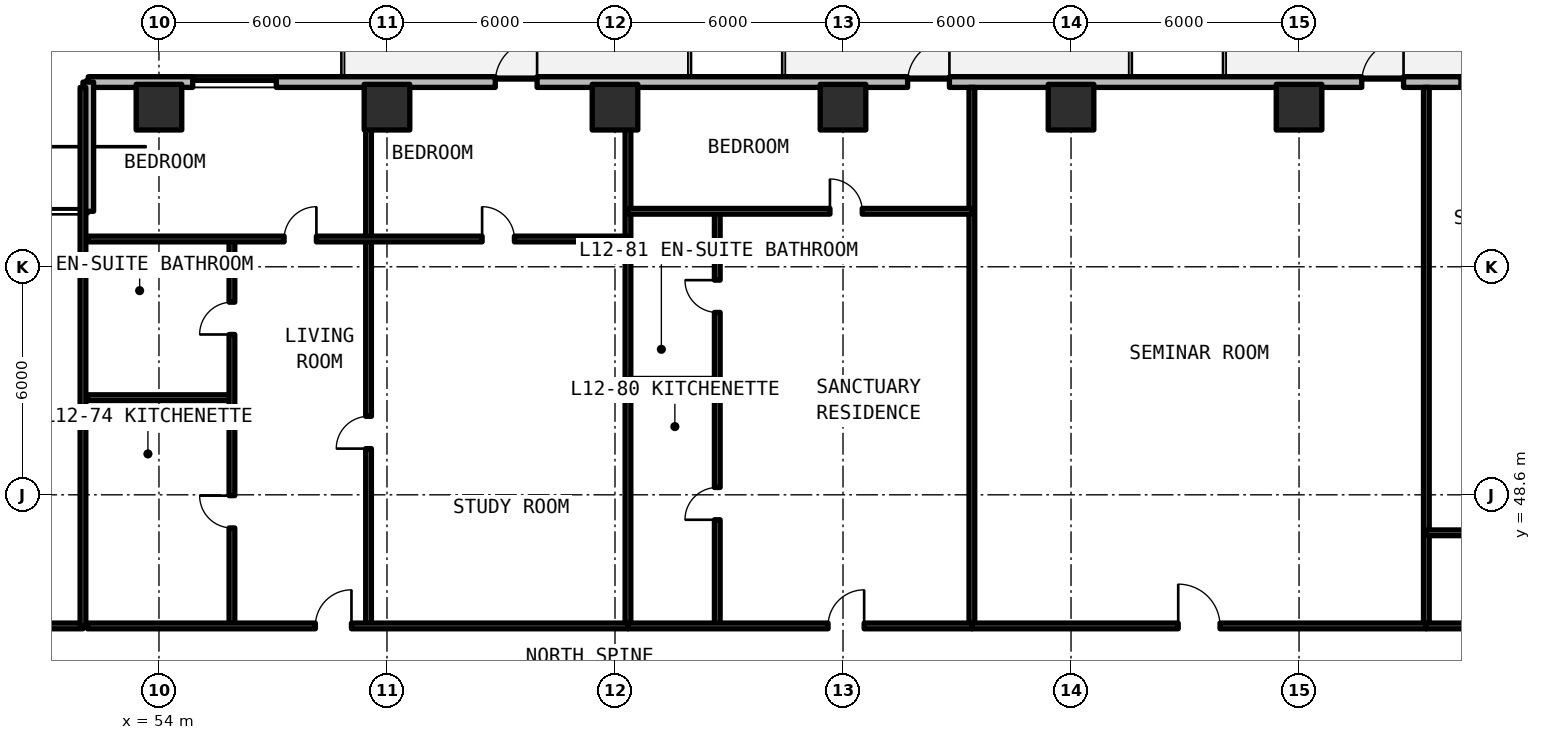
"""IFC4 building model, lengths in metres.
Left out: names, types, materials, properties, quantities, classifications, styles, units other than length and angle.
Written with IfcOpenShell. Run it as: python <this file> out.ifc"""

import sys

from ifc_helpers import new_model, si_unit, direction, frame, frame_2d, origin, origin_2d, place, context, subcontext, project, spatial, rectangle, extrude, element, fill, save


model = new_model("IFC4")
c1 = context("Model", 3, precision=1e-05, world=origin(), true_north=direction((0.0, 1.0)))
c2 = subcontext(c1, "Body", "Model", "MODEL_VIEW")
j1 = project(units=[si_unit("LENGTHUNIT", "METRE"), si_unit("PLANEANGLEUNIT", "RADIAN")], contexts=[c1])
p1 = place(None, origin())
s1 = spatial("IfcSite", under=j1, at=p1, CompositionType="ELEMENT")
p2 = place(p1, origin())
s2 = spatial("IfcBuilding", under=s1, at=p2, CompositionType="ELEMENT")
p3 = place(p2, frame((0.0, 0.0, 45.54)))
s3 = spatial("IfcBuildingStorey", under=s2, at=p3, CompositionType="ELEMENT", Elevation=45.54)
for number, where, z_axis, x_axis in (
    (1, (54.0, 58.8, 0.0), (0.0, 0.0, 1.0), (1.0, 0.0, 0.0)),
    (2, (60.0, 58.8, 0.0), (0.0, 0.0, 1.0), (1.0, 0.0, 0.0)),
    (3, (66.0, 58.8, 0.0), (0.0, 0.0, 1.0), (1.0, 0.0, 0.0)),
    (4, (72.0, 58.8, 0.0), (0.0, 0.0, 1.0), (1.0, 0.0, 0.0)),
    (5, (78.0, 58.8, 0.0), (0.0, 0.0, 1.0), (1.0, 0.0, 0.0)),
    (6, (84.0, 58.8, 0.0), (0.0, 0.0, 1.0), (1.0, 0.0, 0.0)),
):
    element("IfcColumn", number, at=place(p3, frame(where, z_axis=z_axis, x_axis=x_axis)), inside=s3, PredefinedType="COLUMN", context=c2, shape_type="SweptSolid", body=[
        extrude(rectangle(XDim=1.2, YDim=1.2, at=origin_2d()), origin(), (0.0, 0.0, 1.0), 3.3),
    ])
p4 = place(p3, frame((96.542, 59.46, 0.0), z_axis=(0.0, 0.0, 1.0), x_axis=(-1.0, 0.0, 0.0)))
e7 = element("IfcWall", 7, at=p4, inside=s3, PredefinedType="SOLIDWALL", context=c2, shape_type="SweptSolid", body=[
    extrude(rectangle(XDim=44.402, YDim=0.28, at=frame_2d((22.201, 0.0))), origin(), (0.0, 0.0, 1.0), 3.08),
])
p5 = place(p4, frame((32.592, 0.0, 0.0)))
e8 = element("IfcOpeningElement", 8, at=p5, cuts=e7, PredefinedType="OPENING", context=c2, shape_type="SweptSolid", body=[
    extrude(rectangle(XDim=1.1, YDim=2.15, at=frame_2d((0.55, 1.075))), frame((0.0, 0.15, 0.0), z_axis=(0.0, -1.0, 0.0), x_axis=(1.0, 0.0, 0.0)), (0.0, 0.0, 1.0), 0.3),
])
p6 = place(p4, frame((21.742, 0.0, 0.0)))
e9 = element("IfcOpeningElement", 9, at=p6, cuts=e7, PredefinedType="OPENING", context=c2, shape_type="SweptSolid", body=[
    extrude(rectangle(XDim=1.1, YDim=2.15, at=frame_2d((0.55, 1.075))), frame((0.0, 0.15, 0.0), z_axis=(0.0, -1.0, 0.0), x_axis=(1.0, 0.0, 0.0)), (0.0, 0.0, 1.0), 0.3),
])
p7 = place(p4, frame((9.792, 0.0, 0.0)))
e10 = element("IfcOpeningElement", 10, at=p7, cuts=e7, PredefinedType="OPENING", context=c2, shape_type="SweptSolid", body=[
    extrude(rectangle(XDim=1.1, YDim=2.15, at=frame_2d((0.55, 1.075))), frame((0.0, 0.15, 0.0), z_axis=(0.0, -1.0, 0.0), x_axis=(1.0, 0.0, 0.0)), (0.0, 0.0, 1.0), 0.3),
])
p8 = place(p4, frame((39.455, 0.0, 0.78)))
e11 = element("IfcOpeningElement", 11, at=p8, cuts=e7, PredefinedType="OPENING", context=c2, shape_type="SweptSolid", body=[
    extrude(rectangle(XDim=2.2, YDim=1.66, at=frame_2d((1.1, 0.83))), frame((0.0, 0.15, 0.0), z_axis=(0.0, -1.0, 0.0), x_axis=(1.0, 0.0, 0.0)), (0.0, 0.0, 1.0), 0.3),
])
p9 = place(p4, frame((7.432, 0.0, 0.78)))
e12 = element("IfcOpeningElement", 12, at=p9, cuts=e7, PredefinedType="OPENING", context=c2, shape_type="SweptSolid", body=[
    extrude(rectangle(XDim=0.85, YDim=1.65, at=frame_2d((0.425, 0.825))), frame((0.0, 0.15, 0.0), z_axis=(0.0, -1.0, 0.0), x_axis=(1.0, 0.0, 0.0)), (0.0, 0.0, 1.0), 0.3),
])
p10 = place(p4, frame((1.292, 0.0, 0.78)))
e13 = element("IfcOpeningElement", 13, at=p10, cuts=e7, PredefinedType="OPENING", context=c2, shape_type="SweptSolid", body=[
    extrude(rectangle(XDim=2.2, YDim=1.66, at=frame_2d((1.1, 0.83))), frame((0.0, 0.15, 0.0), z_axis=(0.0, -1.0, 0.0), x_axis=(1.0, 0.0, 0.0)), (0.0, 0.0, 1.0), 0.3),
])
p11 = place(p3, frame((52.14, 59.46, 0.0), z_axis=(0.0, 0.0, 1.0), x_axis=(0.0, -1.0, 0.0)))
e14 = element("IfcWall", 14, at=p11, inside=s3, PredefinedType="SOLIDWALL", context=c2, shape_type="SweptSolid", body=[
    extrude(rectangle(XDim=3.4, YDim=0.28, at=frame_2d((1.7, 0.0))), origin(), (0.0, 0.0, 1.0), 3.08),
])
p12 = place(p3, frame((43.6, 45.15, 0.0), z_axis=(0.0, 0.0, 1.0), x_axis=(1.0, 0.0, 0.0)))
e15 = element("IfcWall", 15, at=p12, inside=s3, PredefinedType="SOLIDWALL", context=c2, shape_type="SweptSolid", body=[
    extrude(rectangle(XDim=8.4, YDim=0.15, at=frame_2d((4.2, 0.0))), origin(), (0.0, 0.0, 1.0), 2.35),
])
p13 = place(p12, frame((3.65, 0.0, 0.0)))
e16 = element("IfcOpeningElement", 16, at=p13, cuts=e15, PredefinedType="OPENING", context=c2, shape_type="SweptSolid", body=[
    extrude(rectangle(XDim=1.1, YDim=2.15, at=frame_2d((0.55, 1.075))), frame((0.0, 0.085, 0.0), z_axis=(0.0, -1.0, 0.0), x_axis=(1.0, 0.0, 0.0)), (0.0, 0.0, 1.0), 0.17),
])
for number, where, z_axis, x_axis in (
    (17, (52.0, 45.15, 0.0), (0.0, 0.0, 1.0), (0.0, 1.0, 0.0)),
    (18, (66.341, 45.15, 0.0), (0.0, 0.0, 1.0), (0.0, 1.0, 0.0)),
):
    element("IfcWall", number, at=place(p3, frame(where, z_axis=z_axis, x_axis=x_axis)), inside=s3, PredefinedType="SOLIDWALL", context=c2, shape_type="SweptSolid", body=[
        extrude(rectangle(XDim=14.17, YDim=0.15, at=frame_2d((7.085, 0.0))), origin(), (0.0, 0.0, 1.0), 2.35),
    ])
p14 = place(p3, frame((59.515, 45.15, 0.0), z_axis=(0.0, 0.0, 1.0), x_axis=(0.0, 1.0, 0.0)))
e19 = element("IfcWall", 19, at=p14, inside=s3, PredefinedType="PARTITIONING", context=c2, shape_type="SweptSolid", body=[
    extrude(rectangle(XDim=10.181, YDim=0.15, at=frame_2d((5.09, 0.0))), origin(), (0.0, 0.0, 1.0), 2.35),
])
p15 = place(p14, frame((4.666, 0.0, 0.0)))
e20 = element("IfcOpeningElement", 20, at=p15, cuts=e19, PredefinedType="OPENING", context=c2, shape_type="SweptSolid", body=[
    extrude(rectangle(XDim=0.85, YDim=2.1, at=frame_2d((0.425, 1.05))), frame((0.0, 0.085, 0.0), z_axis=(0.0, -1.0, 0.0), x_axis=(1.0, 0.0, 0.0)), (0.0, 0.0, 1.0), 0.17),
])
p16 = place(p3, frame((52.12, 51.157, 0.0), z_axis=(0.0, 0.0, 1.0), x_axis=(1.0, 0.0, 0.0)))
e21 = element("IfcWall", 21, at=p16, inside=s3, PredefinedType="PARTITIONING", context=c2, shape_type="SweptSolid", body=[
    extrude(rectangle(XDim=3.8, YDim=0.15, at=frame_2d((1.9, 0.0))), origin(), (0.0, 0.0, 1.0), 2.35),
])
p17 = place(p3, frame((55.92, 45.15, 0.0), z_axis=(0.0, 0.0, 1.0), x_axis=(0.0, 1.0, 0.0)))
e22 = element("IfcWall", 22, at=p17, inside=s3, PredefinedType="PARTITIONING", context=c2, shape_type="SweptSolid", body=[
    extrude(rectangle(XDim=10.181, YDim=0.15, at=frame_2d((5.09, 0.0))), origin(), (0.0, 0.0, 1.0), 2.35),
])
p18 = place(p17, frame((2.578, 0.0, 0.0)))
e23 = element("IfcOpeningElement", 23, at=p18, cuts=e22, PredefinedType="OPENING", context=c2, shape_type="SweptSolid", body=[
    extrude(rectangle(XDim=0.85, YDim=2.1, at=frame_2d((0.425, 1.05))), frame((0.0, 0.085, 0.0), z_axis=(0.0, -1.0, 0.0), x_axis=(1.0, 0.0, 0.0)), (0.0, 0.0, 1.0), 0.17),
])
p19 = place(p17, frame((7.669, 0.0, 0.0)))
e24 = element("IfcOpeningElement", 24, at=p19, cuts=e22, PredefinedType="OPENING", context=c2, shape_type="SweptSolid", body=[
    extrude(rectangle(XDim=0.85, YDim=2.1, at=frame_2d((0.425, 1.05))), frame((0.0, 0.085, 0.0), z_axis=(0.0, -1.0, 0.0), x_axis=(1.0, 0.0, 0.0)), (0.0, 0.0, 1.0), 0.17),
])
p20 = place(p3, frame((59.515, 55.331, 0.0), z_axis=(0.0, 0.0, 1.0), x_axis=(0.0, 1.0, 0.0)))
e25 = element("IfcWall", 25, at=p20, inside=s3, PredefinedType="PARTITIONING", context=c2, shape_type="SweptSolid", body=[
    extrude(rectangle(XDim=3.989, YDim=0.15, at=frame_2d((1.995, 0.0))), origin(), (0.0, 0.0, 1.0), 2.35),
])
p21 = place(p3, frame((52.12, 55.331, 0.0), z_axis=(0.0, 0.0, 1.0), x_axis=(1.0, 0.0, 0.0)))
e26 = element("IfcWall", 26, at=p21, inside=s3, PredefinedType="PARTITIONING", context=c2, shape_type="SweptSolid", body=[
    extrude(rectangle(XDim=14.221, YDim=0.15, at=frame_2d((7.111, 0.0))), origin(), (0.0, 0.0, 1.0), 2.35),
])
p22 = place(p21, frame((5.173, 0.0, 0.0)))
e27 = element("IfcOpeningElement", 27, at=p22, cuts=e26, PredefinedType="OPENING", context=c2, shape_type="SweptSolid", body=[
    extrude(rectangle(XDim=0.85, YDim=2.1, at=frame_2d((0.425, 1.05))), frame((0.0, 0.085, 0.0), z_axis=(0.0, -1.0, 0.0), x_axis=(1.0, 0.0, 0.0)), (0.0, 0.0, 1.0), 0.17),
])
p23 = place(p21, frame((10.383, 0.0, 0.0)))
e28 = element("IfcOpeningElement", 28, at=p23, cuts=e26, PredefinedType="OPENING", context=c2, shape_type="SweptSolid", body=[
    extrude(rectangle(XDim=0.85, YDim=2.1, at=frame_2d((0.425, 1.05))), frame((0.0, 0.085, 0.0), z_axis=(0.0, -1.0, 0.0), x_axis=(1.0, 0.0, 0.0)), (0.0, 0.0, 1.0), 0.17),
])
p24 = place(p3, frame((52.12, 45.15, 0.0), z_axis=(0.0, 0.0, 1.0), x_axis=(1.0, 0.0, 0.0)))
e29 = element("IfcWall", 29, at=p24, inside=s3, PredefinedType="SOLIDWALL", context=c2, shape_type="SweptSolid", body=[
    extrude(rectangle(XDim=14.221, YDim=0.15, at=frame_2d((7.111, 0.0))), origin(), (0.0, 0.0, 1.0), 2.35),
])
p25 = place(p24, frame((5.995, 0.0, 0.0)))
e30 = element("IfcOpeningElement", 30, at=p25, cuts=e29, PredefinedType="OPENING", context=c2, shape_type="SweptSolid", body=[
    extrude(rectangle(XDim=0.95, YDim=2.15, at=frame_2d((0.475, 1.075))), frame((0.0, 0.085, 0.0), z_axis=(0.0, -1.0, 0.0), x_axis=(1.0, 0.0, 0.0)), (0.0, 0.0, 1.0), 0.17),
])
p26 = place(p3, frame((75.391, 45.15, 0.0), z_axis=(0.0, 0.0, 1.0), x_axis=(0.0, 1.0, 0.0)))
e31 = element("IfcWall", 31, at=p26, inside=s3, PredefinedType="SOLIDWALL", context=c2, shape_type="SweptSolid", body=[
    extrude(rectangle(XDim=14.17, YDim=0.15, at=frame_2d((7.085, 0.0))), origin(), (0.0, 0.0, 1.0), 2.35),
])
p27 = place(p3, frame((66.341, 51.587, 0.0), z_axis=(0.0, 0.0, 1.0), x_axis=(1.0, 0.0, 0.0)))
e32 = element("IfcWall", 32, at=p27, inside=s3, PredefinedType="PARTITIONING", context=c2, shape_type="SweptSolid", body=[
    extrude(rectangle(XDim=2.35, YDim=0.15, at=frame_2d((1.175, 0.0))), origin(), (0.0, 0.0, 1.0), 2.35),
])
p28 = place(p3, frame((68.691, 45.15, 0.0), z_axis=(0.0, 0.0, 1.0), x_axis=(0.0, 1.0, 0.0)))
e33 = element("IfcWall", 33, at=p28, inside=s3, PredefinedType="PARTITIONING", context=c2, shape_type="SweptSolid", body=[
    extrude(rectangle(XDim=10.91, YDim=0.15, at=frame_2d((5.455, 0.0))), origin(), (0.0, 0.0, 1.0), 2.35),
])
p29 = place(p28, frame((2.794, 0.0, 0.0)))
e34 = element("IfcOpeningElement", 34, at=p29, cuts=e33, PredefinedType="OPENING", context=c2, shape_type="SweptSolid", body=[
    extrude(rectangle(XDim=0.85, YDim=2.1, at=frame_2d((0.425, 1.05))), frame((0.0, 0.085, 0.0), z_axis=(0.0, -1.0, 0.0), x_axis=(1.0, 0.0, 0.0)), (0.0, 0.0, 1.0), 0.17),
])
p30 = place(p28, frame((8.249, 0.0, 0.0)))
e35 = element("IfcOpeningElement", 35, at=p30, cuts=e33, PredefinedType="OPENING", context=c2, shape_type="SweptSolid", body=[
    extrude(rectangle(XDim=0.85, YDim=2.1, at=frame_2d((0.425, 1.05))), frame((0.0, 0.085, 0.0), z_axis=(0.0, -1.0, 0.0), x_axis=(1.0, 0.0, 0.0)), (0.0, 0.0, 1.0), 0.17),
])
p31 = place(p3, frame((66.341, 56.06, 0.0), z_axis=(0.0, 0.0, 1.0), x_axis=(1.0, 0.0, 0.0)))
e36 = element("IfcWall", 36, at=p31, inside=s3, PredefinedType="PARTITIONING", context=c2, shape_type="SweptSolid", body=[
    extrude(rectangle(XDim=9.05, YDim=0.15, at=frame_2d((4.525, 0.0))), origin(), (0.0, 0.0, 1.0), 2.35),
])
p32 = place(p31, frame((5.315, 0.0, 0.0)))
e37 = element("IfcOpeningElement", 37, at=p32, cuts=e36, PredefinedType="OPENING", context=c2, shape_type="SweptSolid", body=[
    extrude(rectangle(XDim=0.85, YDim=2.1, at=frame_2d((0.425, 1.05))), frame((0.0, 0.085, 0.0), z_axis=(0.0, -1.0, 0.0), x_axis=(1.0, 0.0, 0.0)), (0.0, 0.0, 1.0), 0.17),
])
p33 = place(p3, frame((66.341, 45.15, 0.0), z_axis=(0.0, 0.0, 1.0), x_axis=(1.0, 0.0, 0.0)))
e38 = element("IfcWall", 38, at=p33, inside=s3, PredefinedType="SOLIDWALL", context=c2, shape_type="SweptSolid", body=[
    extrude(rectangle(XDim=9.05, YDim=0.15, at=frame_2d((4.525, 0.0))), origin(), (0.0, 0.0, 1.0), 2.35),
])
p34 = place(p33, frame((5.265, 0.0, 0.0)))
e39 = element("IfcOpeningElement", 39, at=p34, cuts=e38, PredefinedType="OPENING", context=c2, shape_type="SweptSolid", body=[
    extrude(rectangle(XDim=0.95, YDim=2.15, at=frame_2d((0.475, 1.075))), frame((0.0, 0.085, 0.0), z_axis=(0.0, -1.0, 0.0), x_axis=(1.0, 0.0, 0.0)), (0.0, 0.0, 1.0), 0.17),
])
p35 = place(p3, frame((87.35, 45.15, 0.0), z_axis=(0.0, 0.0, 1.0), x_axis=(0.0, 1.0, 0.0)))
e40 = element("IfcWall", 40, at=p35, inside=s3, PredefinedType="SOLIDWALL", context=c2, shape_type="SweptSolid", body=[
    extrude(rectangle(XDim=14.17, YDim=0.15, at=frame_2d((7.085, 0.0))), origin(), (0.0, 0.0, 1.0), 2.35),
])
p36 = place(p3, frame((75.391, 45.15, 0.0), z_axis=(0.0, 0.0, 1.0), x_axis=(1.0, 0.0, 0.0)))
e41 = element("IfcWall", 41, at=p36, inside=s3, PredefinedType="SOLIDWALL", context=c2, shape_type="SweptSolid", body=[
    extrude(rectangle(XDim=11.959, YDim=0.15, at=frame_2d((5.979, 0.0))), origin(), (0.0, 0.0, 1.0), 2.35),
])
p37 = place(p36, frame((5.429, 0.0, 0.0)))
e42 = element("IfcOpeningElement", 42, at=p37, cuts=e41, PredefinedType="OPENING", context=c2, shape_type="SweptSolid", body=[
    extrude(rectangle(XDim=1.1, YDim=2.15, at=frame_2d((0.55, 1.075))), frame((0.0, 0.085, 0.0), z_axis=(0.0, -1.0, 0.0), x_axis=(1.0, 0.0, 0.0)), (0.0, 0.0, 1.0), 0.17),
])
p38 = place(p3, frame((87.35, 47.6, 0.0), z_axis=(0.0, 0.0, 1.0), x_axis=(1.0, 0.0, 0.0)))
e43 = element("IfcWall", 43, at=p38, inside=s3, PredefinedType="PARTITIONING", context=c2, shape_type="SweptSolid", body=[
    extrude(rectangle(XDim=4.57, YDim=0.15, at=frame_2d((2.285, 0.0))), origin(), (0.0, 0.0, 1.0), 2.35),
])
p39 = place(p3, frame((87.35, 45.15, 0.0), z_axis=(0.0, 0.0, 1.0), x_axis=(1.0, 0.0, 0.0)))
e44 = element("IfcWall", 44, at=p39, inside=s3, PredefinedType="SOLIDWALL", context=c2, shape_type="SweptSolid", body=[
    extrude(rectangle(XDim=9.05, YDim=0.15, at=frame_2d((4.525, 0.0))), origin(), (0.0, 0.0, 1.0), 2.35),
])
p40 = place(p39, frame((6.375, 0.0, 0.0)))
e45 = element("IfcOpeningElement", 45, at=p40, cuts=e44, PredefinedType="OPENING", context=c2, shape_type="SweptSolid", body=[
    extrude(rectangle(XDim=0.95, YDim=2.15, at=frame_2d((0.475, 1.075))), frame((0.0, 0.085, 0.0), z_axis=(0.0, -1.0, 0.0), x_axis=(1.0, 0.0, 0.0)), (0.0, 0.0, 1.0), 0.17),
])
p41 = place(p5, frame((1.1, 0.0, 0.0), z_axis=(0.0, 0.0, 1.0), x_axis=(-1.0, 0.0, 0.0)))
e46 = element("IfcDoor", 46, at=p41, inside=s3, OperationType="SINGLE_SWING_RIGHT", PredefinedType="DOOR", context=c2, shape_type="SweptSolid", body=[
    extrude(rectangle(XDim=1.1, YDim=2.15, at=frame_2d((0.55, 1.075))), frame((0.0, 0.025, 0.0), z_axis=(0.0, -1.0, 0.0), x_axis=(1.0, 0.0, 0.0)), (0.0, 0.0, 1.0), 0.05),
])
fill(e8, e46)
p42 = place(p6, frame((1.1, 0.0, 0.0), z_axis=(0.0, 0.0, 1.0), x_axis=(-1.0, 0.0, 0.0)))
e47 = element("IfcDoor", 47, at=p42, inside=s3, OperationType="SINGLE_SWING_LEFT", PredefinedType="DOOR", context=c2, shape_type="SweptSolid", body=[
    extrude(rectangle(XDim=1.1, YDim=2.15, at=frame_2d((0.55, 1.075))), frame((0.0, 0.025, 0.0), z_axis=(0.0, -1.0, 0.0), x_axis=(1.0, 0.0, 0.0)), (0.0, 0.0, 1.0), 0.05),
])
fill(e9, e47)
p43 = place(p7, frame((1.1, 0.0, 0.0), z_axis=(0.0, 0.0, 1.0), x_axis=(-1.0, 0.0, 0.0)))
e48 = element("IfcDoor", 48, at=p43, inside=s3, OperationType="SINGLE_SWING_RIGHT", PredefinedType="DOOR", context=c2, shape_type="SweptSolid", body=[
    extrude(rectangle(XDim=1.1, YDim=2.15, at=frame_2d((0.55, 1.075))), frame((0.0, 0.025, 0.0), z_axis=(0.0, -1.0, 0.0), x_axis=(1.0, 0.0, 0.0)), (0.0, 0.0, 1.0), 0.05),
])
fill(e10, e48)
p44 = place(p8, origin())
e49 = element("IfcWindow", 49, at=p44, inside=s3, PartitioningType="SINGLE_PANEL", PredefinedType="WINDOW", context=c2, shape_type="SweptSolid", body=[
    extrude(rectangle(XDim=2.2, YDim=1.66, at=frame_2d((1.1, 0.83))), frame((0.0, 0.03, 0.0), z_axis=(0.0, -1.0, 0.0), x_axis=(1.0, 0.0, 0.0)), (0.0, 0.0, 1.0), 0.06),
])
fill(e11, e49)
p45 = place(p9, origin())
e50 = element("IfcWindow", 50, at=p45, inside=s3, PartitioningType="SINGLE_PANEL", PredefinedType="WINDOW", context=c2, shape_type="SweptSolid", body=[
    extrude(rectangle(XDim=0.85, YDim=1.65, at=frame_2d((0.425, 0.825))), frame((0.0, 0.03, 0.0), z_axis=(0.0, -1.0, 0.0), x_axis=(1.0, 0.0, 0.0)), (0.0, 0.0, 1.0), 0.06),
])
fill(e12, e50)
p46 = place(p15, origin())
e51 = element("IfcDoor", 51, at=p46, inside=s3, OperationType="SINGLE_SWING_LEFT", PredefinedType="DOOR", context=c2, shape_type="SweptSolid", body=[
    extrude(rectangle(XDim=0.85, YDim=2.1, at=frame_2d((0.425, 1.05))), frame((0.0, 0.025, 0.0), z_axis=(0.0, -1.0, 0.0), x_axis=(1.0, 0.0, 0.0)), (0.0, 0.0, 1.0), 0.05),
])
fill(e20, e51)
p47 = place(p18, origin())
e52 = element("IfcDoor", 52, at=p47, inside=s3, OperationType="SINGLE_SWING_RIGHT", PredefinedType="DOOR", context=c2, shape_type="SweptSolid", body=[
    extrude(rectangle(XDim=0.85, YDim=2.1, at=frame_2d((0.425, 1.05))), frame((0.0, 0.025, 0.0), z_axis=(0.0, -1.0, 0.0), x_axis=(1.0, 0.0, 0.0)), (0.0, 0.0, 1.0), 0.05),
])
fill(e23, e52)
p48 = place(p19, origin())
e53 = element("IfcDoor", 53, at=p48, inside=s3, OperationType="SINGLE_SWING_LEFT", PredefinedType="DOOR", context=c2, shape_type="SweptSolid", body=[
    extrude(rectangle(XDim=0.85, YDim=2.1, at=frame_2d((0.425, 1.05))), frame((0.0, 0.025, 0.0), z_axis=(0.0, -1.0, 0.0), x_axis=(1.0, 0.0, 0.0)), (0.0, 0.0, 1.0), 0.05),
])
fill(e24, e53)
p49 = place(p22, origin())
e54 = element("IfcDoor", 54, at=p49, inside=s3, OperationType="SINGLE_SWING_RIGHT", PredefinedType="DOOR", context=c2, shape_type="SweptSolid", body=[
    extrude(rectangle(XDim=0.85, YDim=2.1, at=frame_2d((0.425, 1.05))), frame((0.0, 0.025, 0.0), z_axis=(0.0, -1.0, 0.0), x_axis=(1.0, 0.0, 0.0)), (0.0, 0.0, 1.0), 0.05),
])
fill(e27, e54)
p50 = place(p23, origin())
e55 = element("IfcDoor", 55, at=p50, inside=s3, OperationType="SINGLE_SWING_LEFT", PredefinedType="DOOR", context=c2, shape_type="SweptSolid", body=[
    extrude(rectangle(XDim=0.85, YDim=2.1, at=frame_2d((0.425, 1.05))), frame((0.0, 0.025, 0.0), z_axis=(0.0, -1.0, 0.0), x_axis=(1.0, 0.0, 0.0)), (0.0, 0.0, 1.0), 0.05),
])
fill(e28, e55)
p51 = place(p25, origin())
e56 = element("IfcDoor", 56, at=p51, inside=s3, OperationType="SINGLE_SWING_RIGHT", PredefinedType="DOOR", context=c2, shape_type="SweptSolid", body=[
    extrude(rectangle(XDim=0.95, YDim=2.15, at=frame_2d((0.475, 1.075))), frame((0.0, 0.025, 0.0), z_axis=(0.0, -1.0, 0.0), x_axis=(1.0, 0.0, 0.0)), (0.0, 0.0, 1.0), 0.05),
])
fill(e30, e56)
p52 = place(p29, origin())
e57 = element("IfcDoor", 57, at=p52, inside=s3, OperationType="SINGLE_SWING_LEFT", PredefinedType="DOOR", context=c2, shape_type="SweptSolid", body=[
    extrude(rectangle(XDim=0.85, YDim=2.1, at=frame_2d((0.425, 1.05))), frame((0.0, 0.025, 0.0), z_axis=(0.0, -1.0, 0.0), x_axis=(1.0, 0.0, 0.0)), (0.0, 0.0, 1.0), 0.05),
])
fill(e34, e57)
p53 = place(p30, origin())
e58 = element("IfcDoor", 58, at=p53, inside=s3, OperationType="SINGLE_SWING_RIGHT", PredefinedType="DOOR", context=c2, shape_type="SweptSolid", body=[
    extrude(rectangle(XDim=0.85, YDim=2.1, at=frame_2d((0.425, 1.05))), frame((0.0, 0.025, 0.0), z_axis=(0.0, -1.0, 0.0), x_axis=(1.0, 0.0, 0.0)), (0.0, 0.0, 1.0), 0.05),
])
fill(e35, e58)
p54 = place(p32, origin())
e59 = element("IfcDoor", 59, at=p54, inside=s3, OperationType="SINGLE_SWING_LEFT", PredefinedType="DOOR", context=c2, shape_type="SweptSolid", body=[
    extrude(rectangle(XDim=0.85, YDim=2.1, at=frame_2d((0.425, 1.05))), frame((0.0, 0.025, 0.0), z_axis=(0.0, -1.0, 0.0), x_axis=(1.0, 0.0, 0.0)), (0.0, 0.0, 1.0), 0.05),
])
fill(e37, e59)
p55 = place(p34, origin())
e60 = element("IfcDoor", 60, at=p55, inside=s3, OperationType="SINGLE_SWING_RIGHT", PredefinedType="DOOR", context=c2, shape_type="SweptSolid", body=[
    extrude(rectangle(XDim=0.95, YDim=2.15, at=frame_2d((0.475, 1.075))), frame((0.0, 0.025, 0.0), z_axis=(0.0, -1.0, 0.0), x_axis=(1.0, 0.0, 0.0)), (0.0, 0.0, 1.0), 0.05),
])
fill(e39, e60)
p56 = place(p37, origin())
e61 = element("IfcDoor", 61, at=p56, inside=s3, OperationType="SINGLE_SWING_LEFT", PredefinedType="DOOR", context=c2, shape_type="SweptSolid", body=[
    extrude(rectangle(XDim=1.1, YDim=2.15, at=frame_2d((0.55, 1.075))), frame((0.0, 0.025, 0.0), z_axis=(0.0, -1.0, 0.0), x_axis=(1.0, 0.0, 0.0)), (0.0, 0.0, 1.0), 0.05),
])
fill(e42, e61)
save(model, sys.argv[1])
